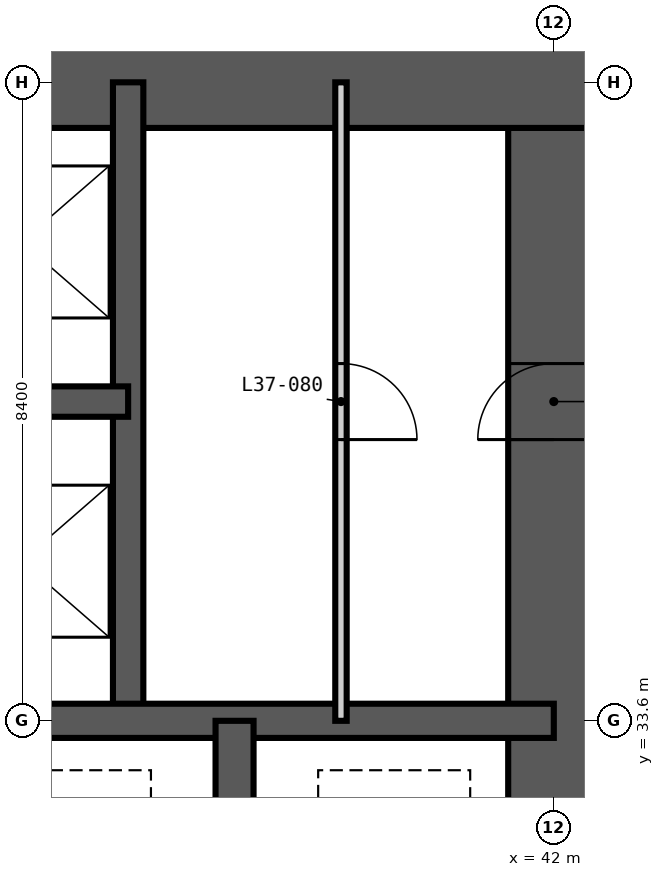
"""IFC4 building model, lengths in metres.
Left out: names, types, materials, properties, quantities, classifications, styles, units other than length and angle.
Written with IfcOpenShell. Run it as: python <this file> out.ifc"""

import sys

from ifc_helpers import new_model, si_unit, direction, frame, frame_2d, origin, place, context, subcontext, project, spatial, rectangle, extrude, element, fill, save


model = new_model("IFC4")
c1 = context("Model", 3, precision=1e-05, world=origin(), true_north=direction((0.0, 1.0)))
c2 = subcontext(c1, "Body", "Model", "MODEL_VIEW")
j1 = project(units=[si_unit("LENGTHUNIT", "METRE"), si_unit("PLANEANGLEUNIT", "RADIAN")], contexts=[c1])
p1 = place(None, origin())
s1 = spatial("IfcSite", under=j1, at=p1, CompositionType="ELEMENT")
p2 = place(p1, origin())
s2 = spatial("IfcBuilding", under=s1, at=p2, CompositionType="ELEMENT")
p3 = place(p2, frame((0.0, 0.0, 144.0)))
s3 = spatial("IfcBuildingStorey", under=s2, at=p3, CompositionType="ELEMENT", Elevation=144.0)
p4 = place(p3, frame((42.0, 17.4, -0.35), z_axis=(0.0, 0.0, 1.0), x_axis=(0.0, 1.0, 0.0)))
e1 = element("IfcWall", 1, at=p4, inside=s3, PredefinedType="SHEAR", context=c2, shape_type="SweptSolid", body=[
    extrude(rectangle(XDim=24.0, YDim=1.2, at=frame_2d((12.0, 0.0))), origin(), (0.0, 0.0, 1.0), 3.6),
])
p5 = place(p4, frame((0.2, 0.0, 0.35)))
e2 = element("IfcOpeningElement", 2, at=p5, cuts=e1, PredefinedType="OPENING", context=c2, shape_type="SweptSolid", body=[
    extrude(rectangle(XDim=1.2, YDim=2.2, at=frame_2d((0.6, 1.1))), frame((0.0, 0.61, 0.0), z_axis=(0.0, -1.0, 0.0), x_axis=(1.0, 0.0, 0.0)), (0.0, 0.0, 1.0), 1.22),
])
p6 = place(p4, frame((11.1, 0.0, 0.35)))
e3 = element("IfcOpeningElement", 3, at=p6, cuts=e1, PredefinedType="OPENING", context=c2, shape_type="SweptSolid", body=[
    extrude(rectangle(XDim=1.8, YDim=2.2, at=frame_2d((0.9, 1.1))), frame((0.0, 0.61, 0.0), z_axis=(0.0, -1.0, 0.0), x_axis=(1.0, 0.0, 0.0)), (0.0, 0.0, 1.0), 1.22),
])
p7 = place(p4, frame((19.9, 0.0, 0.35)))
e4 = element("IfcOpeningElement", 4, at=p7, cuts=e1, PredefinedType="OPENING", context=c2, shape_type="SweptSolid", body=[
    extrude(rectangle(XDim=1.0, YDim=2.1, at=frame_2d((0.5, 1.05))), frame((0.0, 0.61, 0.0), z_axis=(0.0, -1.0, 0.0), x_axis=(1.0, 0.0, 0.0)), (0.0, 0.0, 1.0), 1.22),
])
p8 = place(p3, frame((42.6, 42.0, -0.35), z_axis=(0.0, 0.0, 1.0), x_axis=(-1.0, 0.0, 0.0)))
e5 = element("IfcWall", 5, at=p8, inside=s3, PredefinedType="SHEAR", context=c2, shape_type="SweptSolid", body=[
    extrude(rectangle(XDim=26.4, YDim=1.2, at=frame_2d((13.2, 0.0))), origin(), (0.0, 0.0, 1.0), 3.6),
])
p9 = place(p8, frame((21.1, 0.0, 0.35)))
e6 = element("IfcOpeningElement", 6, at=p9, cuts=e5, PredefinedType="OPENING", context=c2, shape_type="SweptSolid", body=[
    extrude(rectangle(XDim=1.0, YDim=2.1, at=frame_2d((0.5, 1.05))), frame((0.0, 0.61, 0.0), z_axis=(0.0, -1.0, 0.0), x_axis=(1.0, 0.0, 0.0)), (0.0, 0.0, 1.0), 1.22),
])
p10 = place(p8, frame((10.5, 0.0, 0.35)))
e7 = element("IfcOpeningElement", 7, at=p10, cuts=e5, PredefinedType="OPENING", context=c2, shape_type="SweptSolid", body=[
    extrude(rectangle(XDim=1.2, YDim=2.2, at=frame_2d((0.6, 1.1))), frame((0.0, 0.61, 0.0), z_axis=(0.0, -1.0, 0.0), x_axis=(1.0, 0.0, 0.0)), (0.0, 0.0, 1.0), 1.22),
])
p11 = place(p3, frame((36.4, 33.6, -0.35), z_axis=(0.0, 0.0, 1.0), x_axis=(0.0, 1.0, 0.0)))
e8 = element("IfcWall", 8, at=p11, inside=s3, PredefinedType="SHEAR", context=c2, shape_type="SweptSolid", body=[
    extrude(rectangle(XDim=8.4, YDim=0.4, at=frame_2d((4.2, 0.0))), origin(), (0.0, 0.0, 1.0), 3.6),
])
p12 = place(p3, frame((33.6, 37.8, -0.35), z_axis=(0.0, 0.0, 1.0), x_axis=(1.0, 0.0, 0.0)))
e9 = element("IfcWall", 9, at=p12, inside=s3, PredefinedType="SHEAR", context=c2, shape_type="SweptSolid", body=[
    extrude(rectangle(XDim=2.8, YDim=0.4, at=frame_2d((1.4, 0.0))), origin(), (0.0, 0.0, 1.0), 3.6),
])
p13 = place(p3, frame((16.8, 33.6, -0.35), z_axis=(0.0, 0.0, 1.0), x_axis=(1.0, 0.0, 0.0)))
e10 = element("IfcWall", 10, at=p13, inside=s3, PredefinedType="SHEAR", context=c2, shape_type="SweptSolid", body=[
    extrude(rectangle(XDim=25.2, YDim=0.45, at=frame_2d((12.6, 0.0))), origin(), (0.0, 0.0, 1.0), 3.6),
])
p14 = place(p3, frame((37.8, 30.8, -0.35), z_axis=(0.0, 0.0, 1.0), x_axis=(0.0, 1.0, 0.0)))
e11 = element("IfcWall", 11, at=p14, inside=s3, PredefinedType="SHEAR", context=c2, shape_type="SweptSolid", body=[
    extrude(rectangle(XDim=2.8, YDim=0.5, at=frame_2d((1.4, 0.0))), origin(), (0.0, 0.0, 1.0), 3.6),
])
p15 = place(p3, frame((39.2, 33.6, 0.0), z_axis=(0.0, 0.0, 1.0), x_axis=(0.0, 1.0, 0.0)))
e12 = element("IfcWall", 12, at=p15, inside=s3, PredefinedType="PARTITIONING", context=c2, shape_type="SweptSolid", body=[
    extrude(rectangle(XDim=8.4, YDim=0.15, at=frame_2d((4.2, 0.0))), origin(), (0.0, 0.0, 1.0), 3.25),
])
p16 = place(p15, frame((3.7, 0.0, 0.0)))
e13 = element("IfcOpeningElement", 13, at=p16, cuts=e12, PredefinedType="OPENING", context=c2, shape_type="SweptSolid", body=[
    extrude(rectangle(XDim=1.0, YDim=2.1, at=frame_2d((0.5, 1.05))), frame((0.0, 0.085, 0.0), z_axis=(0.0, -1.0, 0.0), x_axis=(1.0, 0.0, 0.0)), (0.0, 0.0, 1.0), 0.17),
])
p17 = place(p7, origin())
e14 = element("IfcDoor", 14, at=p17, inside=s3, OperationType="SINGLE_SWING_LEFT", PredefinedType="DOOR", context=c2, shape_type="SweptSolid", body=[
    extrude(rectangle(XDim=1.0, YDim=2.1, at=frame_2d((0.5, 1.05))), frame((0.0, 0.025, 0.0), z_axis=(0.0, -1.0, 0.0), x_axis=(1.0, 0.0, 0.0)), (0.0, 0.0, 1.0), 0.05),
])
fill(e4, e14)
p18 = place(p16, frame((1.0, 0.0, 0.0), z_axis=(0.0, 0.0, 1.0), x_axis=(-1.0, 0.0, 0.0)))
e15 = element("IfcDoor", 15, at=p18, inside=s3, OperationType="SINGLE_SWING_RIGHT", PredefinedType="DOOR", context=c2, shape_type="SweptSolid", body=[
    extrude(rectangle(XDim=1.0, YDim=2.1, at=frame_2d((0.5, 1.05))), frame((0.0, 0.025, 0.0), z_axis=(0.0, -1.0, 0.0), x_axis=(1.0, 0.0, 0.0)), (0.0, 0.0, 1.0), 0.05),
])
fill(e13, e15)
save(model, sys.argv[1])
